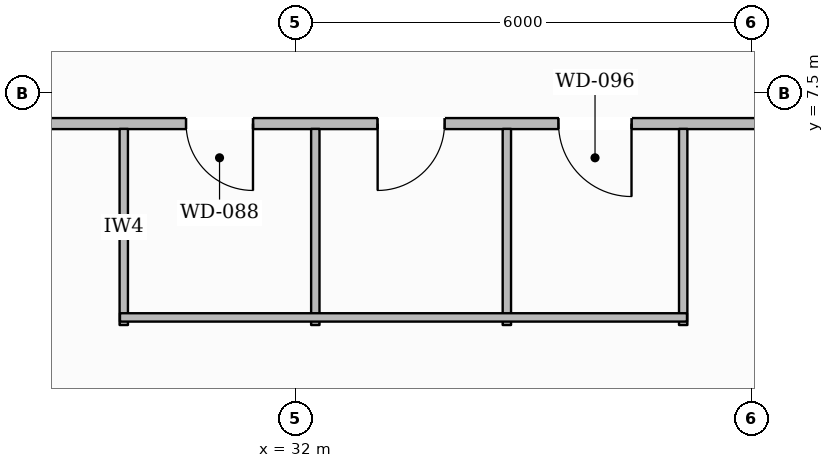
"""IFC4 building model, lengths in metres.
Left out: names, types, materials, properties, quantities, classifications, styles, units other than length and angle.
Written with IfcOpenShell. Run it as: python <this file> out.ifc"""

import sys

from ifc_helpers import new_model, si_unit, direction, frame, frame_2d, origin, place, context, subcontext, project, spatial, rectangle, extrude, element, fill, save


model = new_model("IFC4")
c1 = context("Model", 3, precision=1e-05, world=origin(), true_north=direction((0.0, 1.0)))
c2 = subcontext(c1, "Body", "Model", "MODEL_VIEW")
j1 = project(units=[si_unit("LENGTHUNIT", "METRE"), si_unit("PLANEANGLEUNIT", "RADIAN")], contexts=[c1])
p1 = place(None, origin())
s1 = spatial("IfcSite", under=j1, at=p1, CompositionType="ELEMENT")
p2 = place(p1, origin())
s2 = spatial("IfcBuilding", under=s1, at=p2, CompositionType="ELEMENT")
p3 = place(p2, frame((0.0, 0.0, 40.65)))
s3 = spatial("IfcBuildingStorey", under=s2, at=p3, CompositionType="ELEMENT", Elevation=40.65)
p4 = place(p3, frame((49.92, 7.1, 0.0), z_axis=(0.0, 0.0, 1.0), x_axis=(-1.0, 0.0, 0.0)))
e1 = element("IfcWall", 1, at=p4, inside=s3, PredefinedType="PARTITIONING", context=c2, shape_type="SweptSolid", body=[
    extrude(rectangle(XDim=23.84, YDim=0.145, at=frame_2d((11.92, 0.0))), origin(), (0.0, 0.0, 1.0), 3.278),
])
p5 = place(p4, frame((18.48, 0.0, 0.0)))
e2 = element("IfcOpeningElement", 2, at=p5, cuts=e1, PredefinedType="OPENING", context=c2, shape_type="SweptSolid", body=[
    extrude(rectangle(XDim=0.88, YDim=2.1, at=frame_2d((0.44, 1.05))), frame((0.0, 0.083, 0.0), z_axis=(0.0, -1.0, 0.0), x_axis=(1.0, 0.0, 0.0)), (0.0, 0.0, 1.0), 0.165),
])
p6 = place(p4, frame((15.96, 0.0, 0.0)))
e3 = element("IfcOpeningElement", 3, at=p6, cuts=e1, PredefinedType="OPENING", context=c2, shape_type="SweptSolid", body=[
    extrude(rectangle(XDim=0.88, YDim=2.1, at=frame_2d((0.44, 1.05))), frame((0.0, 0.083, 0.0), z_axis=(0.0, -1.0, 0.0), x_axis=(1.0, 0.0, 0.0)), (0.0, 0.0, 1.0), 0.165),
])
p7 = place(p4, frame((13.5, 0.0, 0.0)))
e4 = element("IfcOpeningElement", 4, at=p7, cuts=e1, PredefinedType="OPENING", context=c2, shape_type="SweptSolid", body=[
    extrude(rectangle(XDim=0.96, YDim=2.1, at=frame_2d((0.48, 1.05))), frame((0.0, 0.083, 0.0), z_axis=(0.0, -1.0, 0.0), x_axis=(1.0, 0.0, 0.0)), (0.0, 0.0, 1.0), 0.165),
])
p8 = place(p4, frame((5.801, 0.0, 0.0)))
e5 = element("IfcOpeningElement", 5, at=p8, cuts=e1, PredefinedType="OPENING", context=c2, shape_type="SweptSolid", body=[
    extrude(rectangle(XDim=1.4, YDim=2.2, at=frame_2d((0.7, 1.1))), frame((0.0, 0.083, 0.0), z_axis=(0.0, -1.0, 0.0), x_axis=(1.0, 0.0, 0.0)), (0.0, 0.0, 1.0), 0.165),
])
for number, where, z_axis, x_axis in (
    (6, (29.74, 4.45, 0.0), (0.0, 0.0, 1.0), (0.0, 1.0, 0.0)),
    (7, (32.26, 4.45, 0.0), (0.0, 0.0, 1.0), (0.0, 1.0, 0.0)),
    (8, (34.78, 4.45, 0.0), (0.0, 0.0, 1.0), (0.0, 1.0, 0.0)),
    (9, (37.1, 4.45, 0.0), (0.0, 0.0, 1.0), (0.0, 1.0, 0.0)),
):
    element("IfcWall", number, at=place(p3, frame(where, z_axis=z_axis, x_axis=x_axis)), inside=s3, PredefinedType="PLUMBINGWALL", context=c2, shape_type="SweptSolid", body=[
        extrude(rectangle(XDim=2.58, YDim=0.11, at=frame_2d((1.29, 0.0))), origin(), (0.0, 0.0, 1.0), 3.59),
    ])
p9 = place(p3, frame((29.69, 4.55, 0.0), z_axis=(0.0, 0.0, 1.0), x_axis=(1.0, 0.0, 0.0)))
e10 = element("IfcWall", 10, at=p9, inside=s3, PredefinedType="PLUMBINGWALL", context=c2, shape_type="SweptSolid", body=[
    extrude(rectangle(XDim=7.46, YDim=0.11, at=frame_2d((3.73, 0.0))), origin(), (0.0, 0.0, 1.0), 3.59),
])
p10 = place(p5, origin())
e11 = element("IfcDoor", 11, at=p10, inside=s3, OperationType="SINGLE_SWING_LEFT", PredefinedType="DOOR", context=c2, shape_type="SweptSolid", body=[
    extrude(rectangle(XDim=0.88, YDim=2.1, at=frame_2d((0.44, 1.05))), frame((0.0, 0.025, 0.0), z_axis=(0.0, -1.0, 0.0), x_axis=(1.0, 0.0, 0.0)), (0.0, 0.0, 1.0), 0.05),
])
fill(e2, e11)
p11 = place(p6, origin())
e12 = element("IfcDoor", 12, at=p11, inside=s3, OperationType="SINGLE_SWING_RIGHT", PredefinedType="DOOR", context=c2, shape_type="SweptSolid", body=[
    extrude(rectangle(XDim=0.88, YDim=2.1, at=frame_2d((0.44, 1.05))), frame((0.0, 0.025, 0.0), z_axis=(0.0, -1.0, 0.0), x_axis=(1.0, 0.0, 0.0)), (0.0, 0.0, 1.0), 0.05),
])
fill(e3, e12)
p12 = place(p7, origin())
e13 = element("IfcDoor", 13, at=p12, inside=s3, OperationType="SINGLE_SWING_LEFT", PredefinedType="DOOR", context=c2, shape_type="SweptSolid", body=[
    extrude(rectangle(XDim=0.96, YDim=2.1, at=frame_2d((0.48, 1.05))), frame((0.0, 0.025, 0.0), z_axis=(0.0, -1.0, 0.0), x_axis=(1.0, 0.0, 0.0)), (0.0, 0.0, 1.0), 0.05),
])
fill(e4, e13)
save(model, sys.argv[1])
